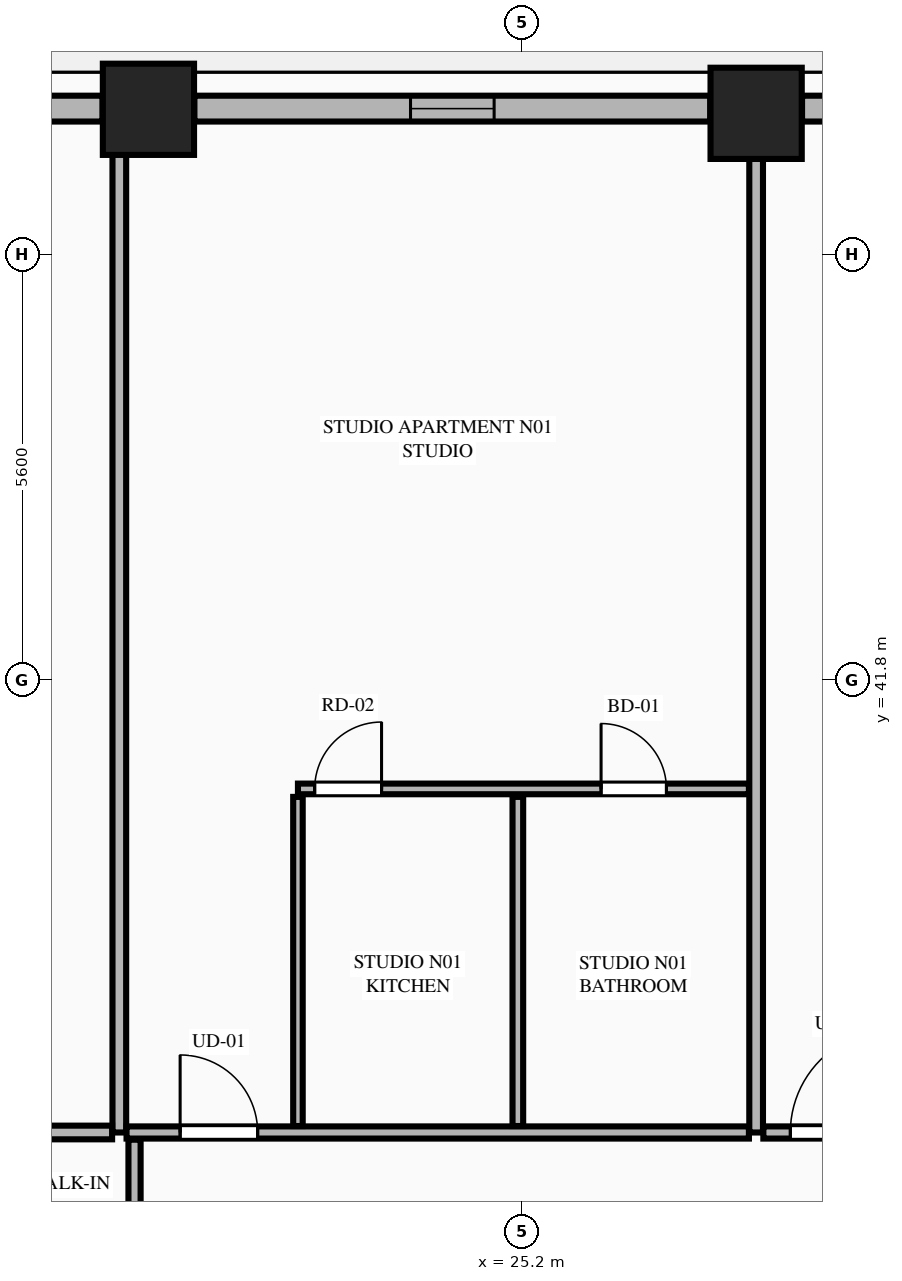
"""IFC4 building model, lengths in metres.
Left out: names, types, materials, properties, quantities, classifications, styles, units other than length and angle.
Written with IfcOpenShell. Run it as: python <this file> out.ifc"""

import sys

from ifc_helpers import new_model, si_unit, direction, frame, frame_2d, origin, origin_2d, place, context, subcontext, project, spatial, rectangle, extrude, element, fill, save


model = new_model("IFC4")
c1 = context("Model", 3, precision=1e-05, world=origin(), true_north=direction((0.0, 1.0)))
c2 = subcontext(c1, "Body", "Model", "MODEL_VIEW")
j1 = project(units=[si_unit("LENGTHUNIT", "METRE"), si_unit("PLANEANGLEUNIT", "RADIAN")], contexts=[c1])
p1 = place(None, origin())
s1 = spatial("IfcSite", under=j1, at=p1, CompositionType="ELEMENT")
p2 = place(p1, origin())
s2 = spatial("IfcBuilding", under=s1, at=p2, CompositionType="ELEMENT")
p3 = place(p2, frame((0.0, 0.0, 49.75)))
s3 = spatial("IfcBuildingStorey", under=s2, at=p3, CompositionType="ELEMENT", Elevation=49.75)
for number, where, z_axis, x_axis in (
    (1, (28.278, 49.258, 0.0), (0.0, 0.0, 1.0), (1.0, 0.0, 0.0)),
    (2, (20.283, 49.311, 0.0), (0.0, 0.0, 1.0), (1.0, 0.0, 0.0)),
):
    element("IfcColumn", number, at=place(p3, frame(where, z_axis=z_axis, x_axis=x_axis)), inside=s3, PredefinedType="COLUMN", context=c2, shape_type="SweptSolid", body=[
        extrude(rectangle(XDim=1.2, YDim=1.2, at=origin_2d()), origin(), (0.0, 0.0, 1.0), 3.55),
    ])
p4 = place(p3, frame((35.918, 49.32, 0.0), z_axis=(0.0, 0.0, 1.0), x_axis=(-1.0, 0.0, 0.0)))
e3 = element("IfcWall", 3, at=p4, inside=s3, PredefinedType="STANDARD", context=c2, shape_type="SweptSolid", body=[
    extrude(rectangle(XDim=7.036, YDim=0.34, at=frame_2d((3.518, 0.0))), origin(), (0.0, 0.0, 1.0), 2.787),
])
p5 = place(p4, frame((3.539, 0.0, 0.0)))
e4 = element("IfcOpeningElement", 4, at=p5, cuts=e3, PredefinedType="OPENING", context=c2, shape_type="SweptSolid", body=[
    extrude(rectangle(XDim=1.1, YDim=2.25, at=frame_2d((0.55, 1.125))), frame((0.0, 0.18, 0.0), z_axis=(0.0, -1.0, 0.0), x_axis=(1.0, 0.0, 0.0)), (0.0, 0.0, 1.0), 0.36),
])
p6 = place(p3, frame((27.674, 49.32, 0.0), z_axis=(0.0, 0.0, 1.0), x_axis=(-1.0, 0.0, 0.0)))
e5 = element("IfcWall", 5, at=p6, inside=s3, PredefinedType="STANDARD", context=c2, shape_type="SweptSolid", body=[
    extrude(rectangle(XDim=6.787, YDim=0.34, at=frame_2d((3.394, 0.0))), origin(), (0.0, 0.0, 1.0), 2.787),
])
p7 = place(p6, frame((2.843, 0.0, 0.75)))
e6 = element("IfcOpeningElement", 6, at=p7, cuts=e5, PredefinedType="OPENING", context=c2, shape_type="SweptSolid", body=[
    extrude(rectangle(XDim=1.1, YDim=1.887, at=frame_2d((0.55, 0.943))), frame((0.0, 0.18, 0.0), z_axis=(0.0, -1.0, 0.0), x_axis=(1.0, 0.0, 0.0)), (0.0, 0.0, 1.0), 0.36),
])
p8 = place(p3, frame((19.679, 49.32, 0.0), z_axis=(0.0, 0.0, 1.0), x_axis=(-1.0, 0.0, 0.0)))
e7 = element("IfcWall", 7, at=p8, inside=s3, PredefinedType="STANDARD", context=c2, shape_type="SweptSolid", body=[
    extrude(rectangle(XDim=1.245, YDim=0.34, at=frame_2d((0.623, 0.0))), origin(), (0.0, 0.0, 1.0), 3.33),
])
p9 = place(p3, frame((19.9, 35.85, 0.0), z_axis=(0.0, 0.0, 1.0), x_axis=(0.0, 1.0, 0.0)))
e8 = element("IfcWall", 8, at=p9, inside=s3, PredefinedType="PARTITIONING", context=c2, shape_type="SweptSolid", body=[
    extrude(rectangle(XDim=13.295, YDim=0.18, at=frame_2d((6.647, 0.0))), origin(), (0.0, 0.0, 1.0), 3.33),
])
p10 = place(p3, frame((28.278, 35.85, 0.0), z_axis=(0.0, 0.0, 1.0), x_axis=(0.0, 1.0, 0.0)))
e9 = element("IfcWall", 9, at=p10, inside=s3, PredefinedType="PARTITIONING", context=c2, shape_type="SweptSolid", body=[
    extrude(rectangle(XDim=13.295, YDim=0.18, at=frame_2d((6.647, 0.0))), origin(), (0.0, 0.0, 1.0), 2.7),
])
p11 = place(p3, frame((19.995, 35.85, 0.0), z_axis=(0.0, 0.0, 1.0), x_axis=(1.0, 0.0, 0.0)))
e10 = element("IfcWall", 10, at=p11, inside=s3, PredefinedType="PARTITIONING", context=c2, shape_type="SweptSolid", body=[
    extrude(rectangle(XDim=8.188, YDim=0.16, at=frame_2d((4.094, 0.0))), origin(), (0.0, 0.0, 1.0), 3.33),
])
p12 = place(p11, frame((0.705, 0.0, 0.0)))
e11 = element("IfcOpeningElement", 11, at=p12, cuts=e10, PredefinedType="OPENING", context=c2, shape_type="SweptSolid", body=[
    extrude(rectangle(XDim=1.02, YDim=2.25, at=frame_2d((0.51, 1.125))), frame((0.0, 0.09, 0.0), z_axis=(0.0, -1.0, 0.0), x_axis=(1.0, 0.0, 0.0)), (0.0, 0.0, 1.0), 0.18),
])
p13 = place(p3, frame((22.25, 35.935, 0.0), z_axis=(0.0, 0.0, 1.0), x_axis=(0.0, 1.0, 0.0)))
e12 = element("IfcWall", 12, at=p13, inside=s3, PredefinedType="PARTITIONING", context=c2, shape_type="SweptSolid", body=[
    extrude(rectangle(XDim=4.33, YDim=0.125, at=frame_2d((2.165, 0.0))), origin(), (0.0, 0.0, 1.0), 2.7),
])
p14 = place(p3, frame((22.25, 40.37, 0.0), z_axis=(0.0, 0.0, 1.0), x_axis=(1.0, 0.0, 0.0)))
e13 = element("IfcWall", 13, at=p14, inside=s3, PredefinedType="PLUMBINGWALL", context=c2, shape_type="SweptSolid", body=[
    extrude(rectangle(XDim=5.933, YDim=0.14, at=frame_2d((2.967, 0.0))), origin(), (0.0, 0.0, 1.0), 3.33),
])
p15 = place(p14, frame((3.988, 0.0, 0.0)))
e14 = element("IfcOpeningElement", 14, at=p15, cuts=e13, PredefinedType="OPENING", context=c2, shape_type="SweptSolid", body=[
    extrude(rectangle(XDim=0.86, YDim=2.1, at=frame_2d((0.43, 1.05))), frame((0.0, 0.08, 0.0), z_axis=(0.0, -1.0, 0.0), x_axis=(1.0, 0.0, 0.0)), (0.0, 0.0, 1.0), 0.16),
])
p16 = place(p14, frame((0.22, 0.0, 0.0)))
e15 = element("IfcOpeningElement", 15, at=p16, cuts=e13, PredefinedType="OPENING", context=c2, shape_type="SweptSolid", body=[
    extrude(rectangle(XDim=0.88, YDim=2.15, at=frame_2d((0.44, 1.075))), frame((0.0, 0.08, 0.0), z_axis=(0.0, -1.0, 0.0), x_axis=(1.0, 0.0, 0.0)), (0.0, 0.0, 1.0), 0.16),
])
p17 = place(p3, frame((25.143, 35.935, 0.0), z_axis=(0.0, 0.0, 1.0), x_axis=(0.0, 1.0, 0.0)))
e16 = element("IfcWall", 16, at=p17, inside=s3, PredefinedType="PLUMBINGWALL", context=c2, shape_type="SweptSolid", body=[
    extrude(rectangle(XDim=4.33, YDim=0.14, at=frame_2d((2.165, 0.0))), origin(), (0.0, 0.0, 1.0), 3.33),
])
p18 = place(p3, frame((28.373, 35.85, 0.0), z_axis=(0.0, 0.0, 1.0), x_axis=(1.0, 0.0, 0.0)))
e17 = element("IfcWall", 17, at=p18, inside=s3, PredefinedType="PARTITIONING", context=c2, shape_type="SweptSolid", body=[
    extrude(rectangle(XDim=16.432, YDim=0.16, at=frame_2d((8.216, 0.0))), origin(), (0.0, 0.0, 1.0), 3.33),
])
p19 = place(p18, frame((0.355, 0.0, 0.0)))
e18 = element("IfcOpeningElement", 18, at=p19, cuts=e17, PredefinedType="OPENING", context=c2, shape_type="SweptSolid", body=[
    extrude(rectangle(XDim=1.35, YDim=2.35, at=frame_2d((0.675, 1.175))), frame((0.0, 0.09, 0.0), z_axis=(0.0, -1.0, 0.0), x_axis=(1.0, 0.0, 0.0)), (0.0, 0.0, 1.0), 0.18),
])
p20 = place(p3, frame((10.665, 35.85, 0.0), z_axis=(0.0, 0.0, 1.0), x_axis=(1.0, 0.0, 0.0)))
e19 = element("IfcWall", 19, at=p20, inside=s3, PredefinedType="PARTITIONING", context=c2, shape_type="SweptSolid", body=[
    extrude(rectangle(XDim=9.14, YDim=0.18, at=frame_2d((4.57, 0.0))), origin(), (0.0, 0.0, 1.0), 3.33),
])
p21 = place(p3, frame((20.1, 16.045, 0.0), z_axis=(0.0, 0.0, 1.0), x_axis=(0.0, 1.0, 0.0)))
e20 = element("IfcWall", 20, at=p21, inside=s3, PredefinedType="PARTITIONING", context=c2, shape_type="SweptSolid", body=[
    extrude(rectangle(XDim=19.71, YDim=0.16, at=frame_2d((9.855, 0.0))), origin(), (0.0, 0.0, 1.0), 2.7),
])
p22 = place(p21, frame((0.45, 0.0, 0.0)))
e21 = element("IfcOpeningElement", 21, at=p22, cuts=e20, PredefinedType="OPENING", context=c2, shape_type="SweptSolid", body=[
    extrude(rectangle(XDim=1.02, YDim=2.25, at=frame_2d((0.51, 1.125))), frame((0.0, 0.09, 0.0), z_axis=(0.0, -1.0, 0.0), x_axis=(1.0, 0.0, 0.0)), (0.0, 0.0, 1.0), 0.18),
])
p23 = place(p7, origin())
e22 = element("IfcWindow", 22, at=p23, inside=s3, PartitioningType="SINGLE_PANEL", PredefinedType="WINDOW", context=c2, shape_type="SweptSolid", body=[
    extrude(rectangle(XDim=1.1, YDim=1.887, at=frame_2d((0.55, 0.943))), frame((0.0, 0.03, 0.0), z_axis=(0.0, -1.0, 0.0), x_axis=(1.0, 0.0, 0.0)), (0.0, 0.0, 1.0), 0.06),
])
fill(e6, e22)
p24 = place(p15, origin())
e23 = element("IfcDoor", 23, at=p24, inside=s3, OperationType="SINGLE_SWING_LEFT", PredefinedType="DOOR", context=c2, shape_type="SweptSolid", body=[
    extrude(rectangle(XDim=0.86, YDim=2.1, at=frame_2d((0.43, 1.05))), frame((0.0, 0.025, 0.0), z_axis=(0.0, -1.0, 0.0), x_axis=(1.0, 0.0, 0.0)), (0.0, 0.0, 1.0), 0.05),
])
fill(e14, e23)
p25 = place(p12, origin())
e24 = element("IfcDoor", 24, at=p25, inside=s3, OperationType="SINGLE_SWING_LEFT", PredefinedType="DOOR", context=c2, shape_type="SweptSolid", body=[
    extrude(rectangle(XDim=1.02, YDim=2.25, at=frame_2d((0.51, 1.125))), frame((0.0, 0.025, 0.0), z_axis=(0.0, -1.0, 0.0), x_axis=(1.0, 0.0, 0.0)), (0.0, 0.0, 1.0), 0.05),
])
fill(e11, e24)
p26 = place(p16, origin())
e25 = element("IfcDoor", 25, at=p26, inside=s3, OperationType="SINGLE_SWING_RIGHT", PredefinedType="DOOR", context=c2, shape_type="SweptSolid", body=[
    extrude(rectangle(XDim=0.88, YDim=2.15, at=frame_2d((0.44, 1.075))), frame((0.0, 0.025, 0.0), z_axis=(0.0, -1.0, 0.0), x_axis=(1.0, 0.0, 0.0)), (0.0, 0.0, 1.0), 0.05),
])
fill(e15, e25)
p27 = place(p19, origin())
e26 = element("IfcDoor", 26, at=p27, inside=s3, OperationType="SINGLE_SWING_RIGHT", PredefinedType="DOOR", context=c2, shape_type="SweptSolid", body=[
    extrude(rectangle(XDim=1.35, YDim=2.35, at=frame_2d((0.675, 1.175))), frame((0.0, 0.025, 0.0), z_axis=(0.0, -1.0, 0.0), x_axis=(1.0, 0.0, 0.0)), (0.0, 0.0, 1.0), 0.05),
])
fill(e18, e26)
save(model, sys.argv[1])
